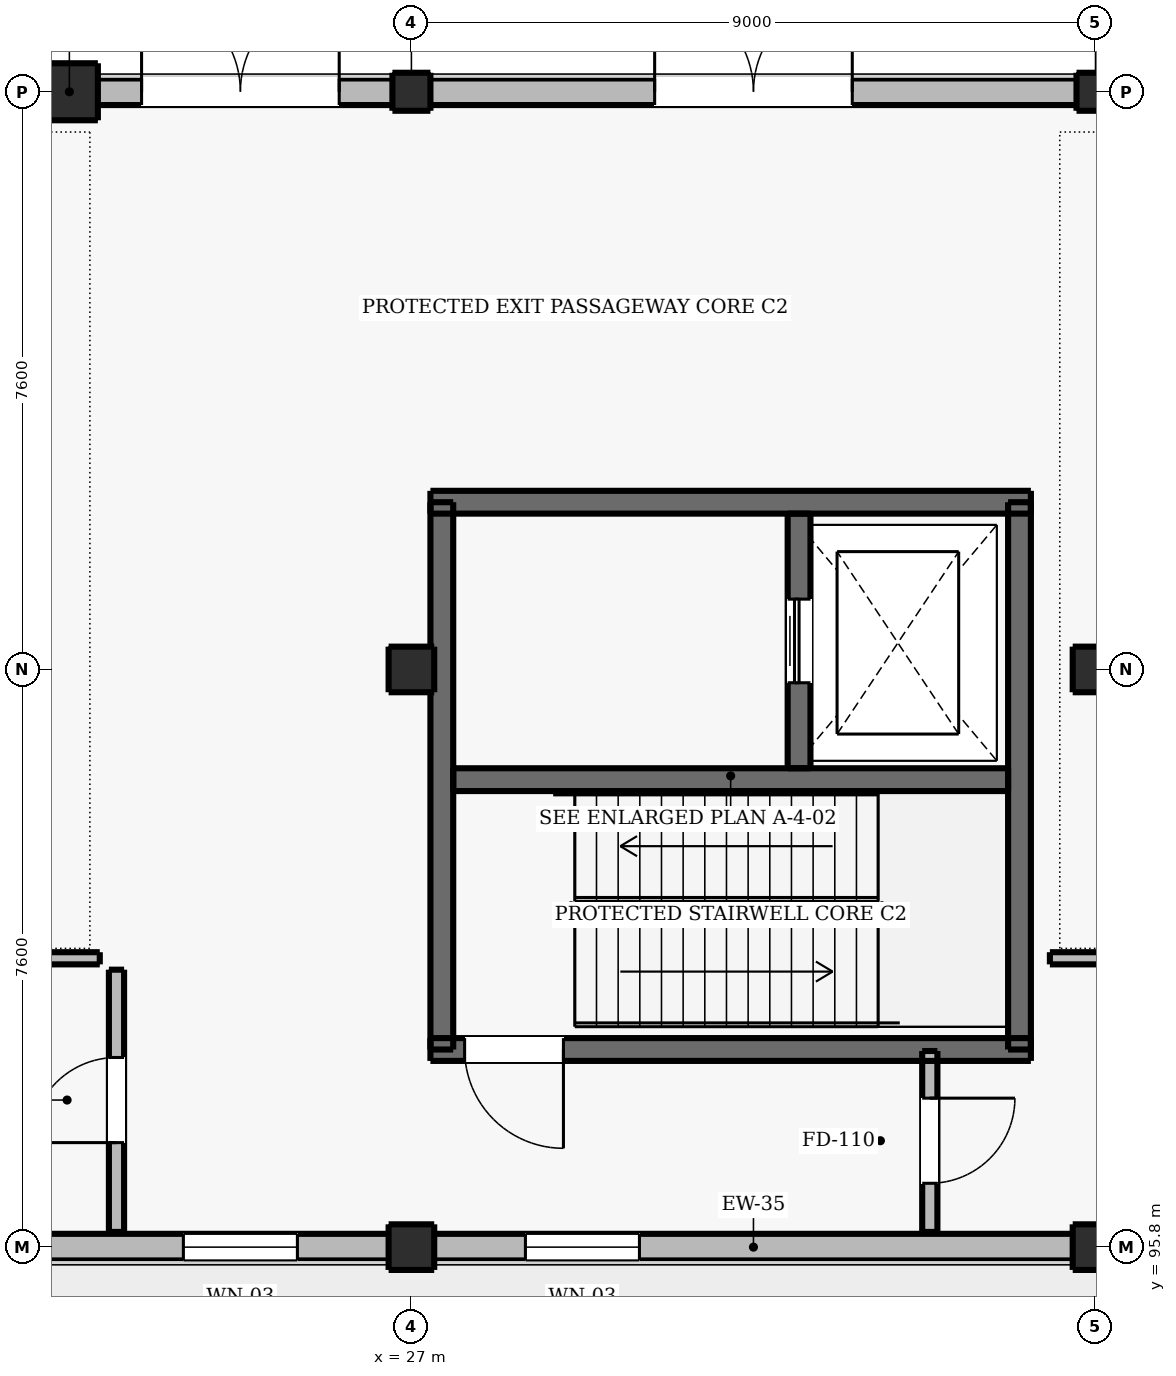
"""IFC4 building model, lengths in metres.
Left out: names, types, materials, properties, quantities, classifications, styles, units other than length and angle.
Written with IfcOpenShell. Run it as: python <this file> out.ifc"""

import sys

from ifc_helpers import new_model, si_unit, direction, frame, frame_2d, origin, origin_2d, place, context, subcontext, project, spatial, rectangle, circle, extrude, element, fill, save


model = new_model("IFC4")
c1 = context("Model", 3, precision=1e-05, world=origin(), true_north=direction((0.0, 1.0)))
c2 = subcontext(c1, "Body", "Model", "MODEL_VIEW")
j1 = project(units=[si_unit("LENGTHUNIT", "METRE"), si_unit("PLANEANGLEUNIT", "RADIAN")], contexts=[c1])
p1 = place(None, origin())
s1 = spatial("IfcSite", under=j1, at=p1, CompositionType="ELEMENT")
p2 = place(p1, origin())
s2 = spatial("IfcBuilding", under=s1, at=p2, CompositionType="ELEMENT")
p3 = place(p2, origin())
s3 = spatial("IfcBuildingStorey", under=s2, at=p3, CompositionType="ELEMENT", Elevation=0.0)
p4 = place(p3, frame((22.5, 111.0, 0.0), z_axis=(0.0, 0.0, 1.0), x_axis=(1.0, 0.0, 0.0)))
e1 = element("IfcColumn", 1, at=p4, inside=s3, PredefinedType="PILASTER", context=c2, shape_type="SweptSolid", body=[
    extrude(rectangle(XDim=0.75, YDim=0.75, at=origin_2d()), origin(), (0.0, 0.0, 1.0), 5.1),
])
for number, where, z_axis, x_axis in (
    (2, (27.0, 95.8, 0.0), (0.0, 0.0, 1.0), (1.0, 0.0, 0.0)),
    (3, (27.0, 103.4, 0.0), (0.0, 0.0, 1.0), (1.0, 0.0, 0.0)),
):
    element("IfcColumn", number, at=place(p3, frame(where, z_axis=z_axis, x_axis=x_axis)), inside=s3, PredefinedType="COLUMN", context=c2, shape_type="SweptSolid", body=[
        extrude(rectangle(XDim=0.6, YDim=0.6, at=origin_2d()), origin(), (0.0, 0.0, 1.0), 5.1),
    ])
p5 = place(p3, frame((27.0, 111.0, 0.0), z_axis=(0.0, 0.0, 1.0), x_axis=(1.0, 0.0, 0.0)))
e4 = element("IfcColumn", 4, at=p5, inside=s3, PredefinedType="COLUMN", context=c2, shape_type="SweptSolid", body=[
    extrude(circle(Radius=0.35, at=origin_2d()), origin(), (0.0, 0.0, 1.0), 5.1),
])
for number, where, z_axis, x_axis in (
    (5, (36.0, 95.8, 0.0), (0.0, 0.0, 1.0), (1.0, 0.0, 0.0)),
    (6, (36.0, 103.4, 0.0), (0.0, 0.0, 1.0), (1.0, 0.0, 0.0)),
):
    element("IfcColumn", number, at=place(p3, frame(where, z_axis=z_axis, x_axis=x_axis)), inside=s3, PredefinedType="COLUMN", context=c2, shape_type="SweptSolid", body=[
        extrude(rectangle(XDim=0.6, YDim=0.6, at=origin_2d()), origin(), (0.0, 0.0, 1.0), 5.1),
    ])
p6 = place(p3, frame((36.0, 111.0, 0.0), z_axis=(0.0, 0.0, 1.0), x_axis=(1.0, 0.0, 0.0)))
e7 = element("IfcColumn", 7, at=p6, inside=s3, PredefinedType="COLUMN", context=c2, shape_type="SweptSolid", body=[
    extrude(circle(Radius=0.35, at=origin_2d()), origin(), (0.0, 0.0, 1.0), 5.1),
])
p7 = place(p3, frame((27.25, 98.4, 0.0), z_axis=(0.0, 0.0, 1.0), x_axis=(1.0, 0.0, 0.0)))
e8 = element("IfcWall", 8, at=p7, inside=s3, PredefinedType="SHEAR", context=c2, shape_type="SweptSolid", body=[
    extrude(rectangle(XDim=7.9, YDim=0.3, at=frame_2d((3.95, 0.0))), origin(), (0.0, 0.0, 1.0), 5.1),
])
p8 = place(p7, frame((0.45, 0.0, 0.0)))
e9 = element("IfcOpeningElement", 9, at=p8, cuts=e8, PredefinedType="OPENING", context=c2, shape_type="SweptSolid", body=[
    extrude(rectangle(XDim=1.3, YDim=2.15, at=frame_2d((0.65, 1.075))), frame((0.0, 0.16, 0.0), z_axis=(0.0, -1.0, 0.0), x_axis=(1.0, 0.0, 0.0)), (0.0, 0.0, 1.0), 0.32),
])
p9 = place(p3, frame((27.25, 105.6, 0.0), z_axis=(0.0, 0.0, 1.0), x_axis=(1.0, 0.0, 0.0)))
e10 = element("IfcWall", 10, at=p9, inside=s3, PredefinedType="SHEAR", context=c2, shape_type="SweptSolid", body=[
    extrude(rectangle(XDim=7.9, YDim=0.3, at=frame_2d((3.95, 0.0))), origin(), (0.0, 0.0, 1.0), 5.1),
])
for number, where, z_axis, x_axis in (
    (11, (27.4, 98.4, 0.0), (0.0, 0.0, 1.0), (0.0, 1.0, 0.0)),
    (12, (35.0, 98.4, 0.0), (0.0, 0.0, 1.0), (0.0, 1.0, 0.0)),
):
    element("IfcWall", number, at=place(p3, frame(where, z_axis=z_axis, x_axis=x_axis)), inside=s3, PredefinedType="SHEAR", context=c2, shape_type="SweptSolid", body=[
        extrude(rectangle(XDim=7.2, YDim=0.3, at=frame_2d((3.6, 0.0))), origin(), (0.0, 0.0, 1.0), 5.1),
    ])
p10 = place(p3, frame((27.55, 101.95, 0.0), z_axis=(0.0, 0.0, 1.0), x_axis=(1.0, 0.0, 0.0)))
e13 = element("IfcWall", 13, at=p10, inside=s3, PredefinedType="SHEAR", context=c2, shape_type="SweptSolid", body=[
    extrude(rectangle(XDim=7.3, YDim=0.3, at=frame_2d((3.65, 0.0))), origin(), (0.0, 0.0, 1.0), 5.1),
])
p11 = place(p3, frame((32.1, 102.1, 0.0), z_axis=(0.0, 0.0, 1.0), x_axis=(0.0, 1.0, 0.0)))
e14 = element("IfcWall", 14, at=p11, inside=s3, PredefinedType="SHEAR", context=c2, shape_type="SweptSolid", body=[
    extrude(rectangle(XDim=3.35, YDim=0.3, at=frame_2d((1.675, 0.0))), origin(), (0.0, 0.0, 1.0), 5.1),
])
p12 = place(p11, frame((1.125, 0.0, 0.0)))
e15 = element("IfcOpeningElement", 15, at=p12, cuts=e14, PredefinedType="OPENING", context=c2, shape_type="SweptSolid", body=[
    extrude(rectangle(XDim=1.1, YDim=2.15, at=frame_2d((0.55, 1.075))), frame((0.0, 0.16, 0.0), z_axis=(0.0, -1.0, 0.0), x_axis=(1.0, 0.0, 0.0)), (0.0, 0.0, 1.0), 0.32),
])
p13 = place(p3, frame((0.0, 111.0, 0.0), z_axis=(0.0, 0.0, 1.0), x_axis=(1.0, 0.0, 0.0)))
e16 = element("IfcWall", 16, at=p13, inside=s3, PredefinedType="SOLIDWALL", context=c2, shape_type="SweptSolid", body=[
    extrude(rectangle(XDim=45.0, YDim=0.35, at=frame_2d((22.5, 0.0))), origin(), (0.0, 0.0, 1.0), 4.01),
])
p14 = place(p13, frame((23.45, 0.0, 0.0)))
e17 = element("IfcOpeningElement", 17, at=p14, cuts=e16, PredefinedType="OPENING", context=c2, shape_type="SweptSolid", body=[
    extrude(rectangle(XDim=2.6, YDim=2.6, at=frame_2d((1.3, 1.3))), frame((0.0, 0.185, 0.0), z_axis=(0.0, -1.0, 0.0), x_axis=(1.0, 0.0, 0.0)), (0.0, 0.0, 1.0), 0.37),
])
p15 = place(p13, frame((30.2, 0.0, 0.0)))
e18 = element("IfcOpeningElement", 18, at=p15, cuts=e16, PredefinedType="OPENING", context=c2, shape_type="SweptSolid", body=[
    extrude(rectangle(XDim=2.6, YDim=2.6, at=frame_2d((1.3, 1.3))), frame((0.0, 0.185, 0.0), z_axis=(0.0, -1.0, 0.0), x_axis=(1.0, 0.0, 0.0)), (0.0, 0.0, 1.0), 0.37),
])
p16 = place(p13, frame((1.65, 0.0, 1.05)))
e19 = element("IfcOpeningElement", 19, at=p16, cuts=e16, PredefinedType="OPENING", context=c2, shape_type="SweptSolid", body=[
    extrude(rectangle(XDim=1.2, YDim=1.5, at=frame_2d((0.6, 0.75))), frame((0.0, 0.185, 0.0), z_axis=(0.0, -1.0, 0.0), x_axis=(1.0, 0.0, 0.0)), (0.0, 0.0, 1.0), 0.37),
])
p17 = place(p13, frame((6.15, 0.0, 1.05)))
e20 = element("IfcOpeningElement", 20, at=p17, cuts=e16, PredefinedType="OPENING", context=c2, shape_type="SweptSolid", body=[
    extrude(rectangle(XDim=1.2, YDim=1.5, at=frame_2d((0.6, 0.75))), frame((0.0, 0.185, 0.0), z_axis=(0.0, -1.0, 0.0), x_axis=(1.0, 0.0, 0.0)), (0.0, 0.0, 1.0), 0.37),
])
p18 = place(p13, frame((10.65, 0.0, 1.05)))
e21 = element("IfcOpeningElement", 21, at=p18, cuts=e16, PredefinedType="OPENING", context=c2, shape_type="SweptSolid", body=[
    extrude(rectangle(XDim=1.2, YDim=1.5, at=frame_2d((0.6, 0.75))), frame((0.0, 0.185, 0.0), z_axis=(0.0, -1.0, 0.0), x_axis=(1.0, 0.0, 0.0)), (0.0, 0.0, 1.0), 0.37),
])
p19 = place(p13, frame((15.15, 0.0, 1.05)))
e22 = element("IfcOpeningElement", 22, at=p19, cuts=e16, PredefinedType="OPENING", context=c2, shape_type="SweptSolid", body=[
    extrude(rectangle(XDim=1.2, YDim=1.5, at=frame_2d((0.6, 0.75))), frame((0.0, 0.185, 0.0), z_axis=(0.0, -1.0, 0.0), x_axis=(1.0, 0.0, 0.0)), (0.0, 0.0, 1.0), 0.37),
])
p20 = place(p13, frame((19.65, 0.0, 1.05)))
e23 = element("IfcOpeningElement", 23, at=p20, cuts=e16, PredefinedType="OPENING", context=c2, shape_type="SweptSolid", body=[
    extrude(rectangle(XDim=1.2, YDim=1.5, at=frame_2d((0.6, 0.75))), frame((0.0, 0.185, 0.0), z_axis=(0.0, -1.0, 0.0), x_axis=(1.0, 0.0, 0.0)), (0.0, 0.0, 1.0), 0.37),
])
p21 = place(p13, frame((37.65, 0.0, 1.05)))
e24 = element("IfcOpeningElement", 24, at=p21, cuts=e16, PredefinedType="OPENING", context=c2, shape_type="SweptSolid", body=[
    extrude(rectangle(XDim=1.2, YDim=1.5, at=frame_2d((0.6, 0.75))), frame((0.0, 0.185, 0.0), z_axis=(0.0, -1.0, 0.0), x_axis=(1.0, 0.0, 0.0)), (0.0, 0.0, 1.0), 0.37),
])
p22 = place(p13, frame((42.15, 0.0, 1.05)))
e25 = element("IfcOpeningElement", 25, at=p22, cuts=e16, PredefinedType="OPENING", context=c2, shape_type="SweptSolid", body=[
    extrude(rectangle(XDim=1.2, YDim=1.5, at=frame_2d((0.6, 0.75))), frame((0.0, 0.185, 0.0), z_axis=(0.0, -1.0, 0.0), x_axis=(1.0, 0.0, 0.0)), (0.0, 0.0, 1.0), 0.37),
])
p23 = place(p3, frame((45.0, 95.8, 0.0), z_axis=(0.0, 0.0, 1.0), x_axis=(-1.0, 0.0, 0.0)))
e26 = element("IfcWall", 26, at=p23, inside=s3, PredefinedType="SOLIDWALL", context=c2, shape_type="SweptSolid", body=[
    extrude(rectangle(XDim=27.0, YDim=0.35, at=frame_2d((13.5, 0.0))), origin(), (0.0, 0.0, 1.0), 4.01),
])
p24 = place(p23, frame((1.5, 0.0, 1.05)))
e27 = element("IfcOpeningElement", 27, at=p24, cuts=e26, PredefinedType="OPENING", context=c2, shape_type="SweptSolid", body=[
    extrude(rectangle(XDim=1.5, YDim=1.6, at=frame_2d((0.75, 0.8))), frame((0.0, 0.185, 0.0), z_axis=(0.0, -1.0, 0.0), x_axis=(1.0, 0.0, 0.0)), (0.0, 0.0, 1.0), 0.37),
])
p25 = place(p23, frame((6.0, 0.0, 1.05)))
e28 = element("IfcOpeningElement", 28, at=p25, cuts=e26, PredefinedType="OPENING", context=c2, shape_type="SweptSolid", body=[
    extrude(rectangle(XDim=1.5, YDim=1.6, at=frame_2d((0.75, 0.8))), frame((0.0, 0.185, 0.0), z_axis=(0.0, -1.0, 0.0), x_axis=(1.0, 0.0, 0.0)), (0.0, 0.0, 1.0), 0.37),
])
p26 = place(p23, frame((15.0, 0.0, 1.05)))
e29 = element("IfcOpeningElement", 29, at=p26, cuts=e26, PredefinedType="OPENING", context=c2, shape_type="SweptSolid", body=[
    extrude(rectangle(XDim=1.5, YDim=1.6, at=frame_2d((0.75, 0.8))), frame((0.0, 0.185, 0.0), z_axis=(0.0, -1.0, 0.0), x_axis=(1.0, 0.0, 0.0)), (0.0, 0.0, 1.0), 0.37),
])
p27 = place(p23, frame((19.5, 0.0, 1.05)))
e30 = element("IfcOpeningElement", 30, at=p27, cuts=e26, PredefinedType="OPENING", context=c2, shape_type="SweptSolid", body=[
    extrude(rectangle(XDim=1.5, YDim=1.6, at=frame_2d((0.75, 0.8))), frame((0.0, 0.185, 0.0), z_axis=(0.0, -1.0, 0.0), x_axis=(1.0, 0.0, 0.0)), (0.0, 0.0, 1.0), 0.37),
])
p28 = place(p23, frame((24.0, 0.0, 1.05)))
e31 = element("IfcOpeningElement", 31, at=p28, cuts=e26, PredefinedType="OPENING", context=c2, shape_type="SweptSolid", body=[
    extrude(rectangle(XDim=1.5, YDim=1.6, at=frame_2d((0.75, 0.8))), frame((0.0, 0.185, 0.0), z_axis=(0.0, -1.0, 0.0), x_axis=(1.0, 0.0, 0.0)), (0.0, 0.0, 1.0), 0.37),
])
p29 = place(p3, frame((23.12, 96.0, 0.0), z_axis=(0.0, 0.0, 1.0), x_axis=(0.0, 1.0, 0.0)))
e32 = element("IfcWall", 32, at=p29, inside=s3, PredefinedType="PARTITIONING", context=c2, shape_type="SweptSolid", body=[
    extrude(rectangle(XDim=3.45, YDim=0.2, at=frame_2d((1.725, 0.0))), origin(), (0.0, 0.0, 1.0), 4.82),
])
p30 = place(p29, frame((1.175, 0.0, 0.0)))
e33 = element("IfcOpeningElement", 33, at=p30, cuts=e32, PredefinedType="OPENING", context=c2, shape_type="SweptSolid", body=[
    extrude(rectangle(XDim=1.12, YDim=2.15, at=frame_2d((0.56, 1.075))), frame((0.0, 0.11, 0.0), z_axis=(0.0, -1.0, 0.0), x_axis=(1.0, 0.0, 0.0)), (0.0, 0.0, 1.0), 0.22),
])
p31 = place(p3, frame((33.82, 96.0, 0.0), z_axis=(0.0, 0.0, 1.0), x_axis=(0.0, 1.0, 0.0)))
e34 = element("IfcWall", 34, at=p31, inside=s3, PredefinedType="PARTITIONING", context=c2, shape_type="SweptSolid", body=[
    extrude(rectangle(XDim=2.38, YDim=0.2, at=frame_2d((1.19, 0.0))), origin(), (0.0, 0.0, 1.0), 4.82),
])
p32 = place(p31, frame((0.64, 0.0, 0.0)))
e35 = element("IfcOpeningElement", 35, at=p32, cuts=e34, PredefinedType="OPENING", context=c2, shape_type="SweptSolid", body=[
    extrude(rectangle(XDim=1.12, YDim=2.15, at=frame_2d((0.56, 1.075))), frame((0.0, 0.11, 0.0), z_axis=(0.0, -1.0, 0.0), x_axis=(1.0, 0.0, 0.0)), (0.0, 0.0, 1.0), 0.22),
])
p33 = place(p3, frame((12.875, 99.6, 0.0), z_axis=(0.0, 0.0, 1.0), x_axis=(1.0, 0.0, 0.0)))
e36 = element("IfcWall", 36, at=p33, inside=s3, PredefinedType="PARTITIONING", context=c2, shape_type="SweptSolid", body=[
    extrude(rectangle(XDim=10.025, YDim=0.16, at=frame_2d((5.012, 0.0))), origin(), (0.0, 0.0, 1.0), 4.82),
])
p34 = place(p33, frame((4.462, 0.0, 0.0)))
e37 = element("IfcOpeningElement", 37, at=p34, cuts=e36, PredefinedType="OPENING", context=c2, shape_type="SweptSolid", body=[
    extrude(rectangle(XDim=1.1, YDim=2.15, at=frame_2d((0.55, 1.075))), frame((0.0, 0.09, 0.0), z_axis=(0.0, -1.0, 0.0), x_axis=(1.0, 0.0, 0.0)), (0.0, 0.0, 1.0), 0.18),
])
p35 = place(p3, frame((35.4, 99.6, 0.0), z_axis=(0.0, 0.0, 1.0), x_axis=(1.0, 0.0, 0.0)))
e38 = element("IfcWall", 38, at=p35, inside=s3, PredefinedType="PARTITIONING", context=c2, shape_type="SweptSolid", body=[
    extrude(rectangle(XDim=5.2, YDim=0.16, at=frame_2d((2.6, 0.0))), origin(), (0.0, 0.0, 1.0), 4.82),
])
p36 = place(p35, frame((2.0, 0.0, 0.0)))
e39 = element("IfcOpeningElement", 39, at=p36, cuts=e38, PredefinedType="OPENING", context=c2, shape_type="SweptSolid", body=[
    extrude(rectangle(XDim=1.2, YDim=2.2, at=frame_2d((0.6, 1.1))), frame((0.0, 0.09, 0.0), z_axis=(0.0, -1.0, 0.0), x_axis=(1.0, 0.0, 0.0)), (0.0, 0.0, 1.0), 0.18),
])
p37 = place(p14, origin())
e40 = element("IfcDoor", 40, at=p37, inside=s3, OperationType="DOUBLE_DOOR_SINGLE_SWING", PredefinedType="DOOR", context=c2, shape_type="SweptSolid", body=[
    extrude(rectangle(XDim=2.6, YDim=2.6, at=frame_2d((1.3, 1.3))), frame((0.0, 0.025, 0.0), z_axis=(0.0, -1.0, 0.0), x_axis=(1.0, 0.0, 0.0)), (0.0, 0.0, 1.0), 0.05),
])
fill(e17, e40)
p38 = place(p15, origin())
e41 = element("IfcDoor", 41, at=p38, inside=s3, OperationType="DOUBLE_DOOR_SINGLE_SWING", PredefinedType="DOOR", context=c2, shape_type="SweptSolid", body=[
    extrude(rectangle(XDim=2.6, YDim=2.6, at=frame_2d((1.3, 1.3))), frame((0.0, 0.025, 0.0), z_axis=(0.0, -1.0, 0.0), x_axis=(1.0, 0.0, 0.0)), (0.0, 0.0, 1.0), 0.05),
])
fill(e18, e41)
p39 = place(p26, origin())
e42 = element("IfcWindow", 42, at=p39, inside=s3, PartitioningType="SINGLE_PANEL", PredefinedType="WINDOW", context=c2, shape_type="SweptSolid", body=[
    extrude(rectangle(XDim=1.5, YDim=1.6, at=frame_2d((0.75, 0.8))), frame((0.0, 0.03, 0.0), z_axis=(0.0, -1.0, 0.0), x_axis=(1.0, 0.0, 0.0)), (0.0, 0.0, 1.0), 0.06),
])
fill(e29, e42)
p40 = place(p27, origin())
e43 = element("IfcWindow", 43, at=p40, inside=s3, PartitioningType="SINGLE_PANEL", PredefinedType="WINDOW", context=c2, shape_type="SweptSolid", body=[
    extrude(rectangle(XDim=1.5, YDim=1.6, at=frame_2d((0.75, 0.8))), frame((0.0, 0.03, 0.0), z_axis=(0.0, -1.0, 0.0), x_axis=(1.0, 0.0, 0.0)), (0.0, 0.0, 1.0), 0.06),
])
fill(e30, e43)
p41 = place(p12, origin())
e44 = element("IfcDoor", 44, at=p41, inside=s3, OperationType="DOUBLE_DOOR_SLIDING", PredefinedType="DOOR", context=c2, shape_type="SweptSolid", body=[
    extrude(rectangle(XDim=1.1, YDim=2.15, at=frame_2d((0.55, 1.075))), frame((0.0, 0.025, 0.0), z_axis=(0.0, -1.0, 0.0), x_axis=(1.0, 0.0, 0.0)), (0.0, 0.0, 1.0), 0.05),
])
fill(e15, e44)
p42 = place(p8, frame((1.3, 0.0, 0.0), z_axis=(0.0, 0.0, 1.0), x_axis=(-1.0, 0.0, 0.0)))
e45 = element("IfcDoor", 45, at=p42, inside=s3, OperationType="SINGLE_SWING_RIGHT", PredefinedType="DOOR", context=c2, shape_type="SweptSolid", body=[
    extrude(rectangle(XDim=1.3, YDim=2.15, at=frame_2d((0.65, 1.075))), frame((0.0, 0.025, 0.0), z_axis=(0.0, -1.0, 0.0), x_axis=(1.0, 0.0, 0.0)), (0.0, 0.0, 1.0), 0.05),
])
fill(e9, e45)
p43 = place(p30, origin())
e46 = element("IfcDoor", 46, at=p43, inside=s3, OperationType="SINGLE_SWING_LEFT", PredefinedType="DOOR", context=c2, shape_type="SweptSolid", body=[
    extrude(rectangle(XDim=1.12, YDim=2.15, at=frame_2d((0.56, 1.075))), frame((0.0, 0.025, 0.0), z_axis=(0.0, -1.0, 0.0), x_axis=(1.0, 0.0, 0.0)), (0.0, 0.0, 1.0), 0.05),
])
fill(e33, e46)
p44 = place(p32, frame((1.12, 0.0, 0.0), z_axis=(0.0, 0.0, 1.0), x_axis=(-1.0, 0.0, 0.0)))
e47 = element("IfcDoor", 47, at=p44, inside=s3, OperationType="SINGLE_SWING_RIGHT", PredefinedType="DOOR", context=c2, shape_type="SweptSolid", body=[
    extrude(rectangle(XDim=1.12, YDim=2.15, at=frame_2d((0.56, 1.075))), frame((0.0, 0.025, 0.0), z_axis=(0.0, -1.0, 0.0), x_axis=(1.0, 0.0, 0.0)), (0.0, 0.0, 1.0), 0.05),
])
fill(e35, e47)
save(model, sys.argv[1])
